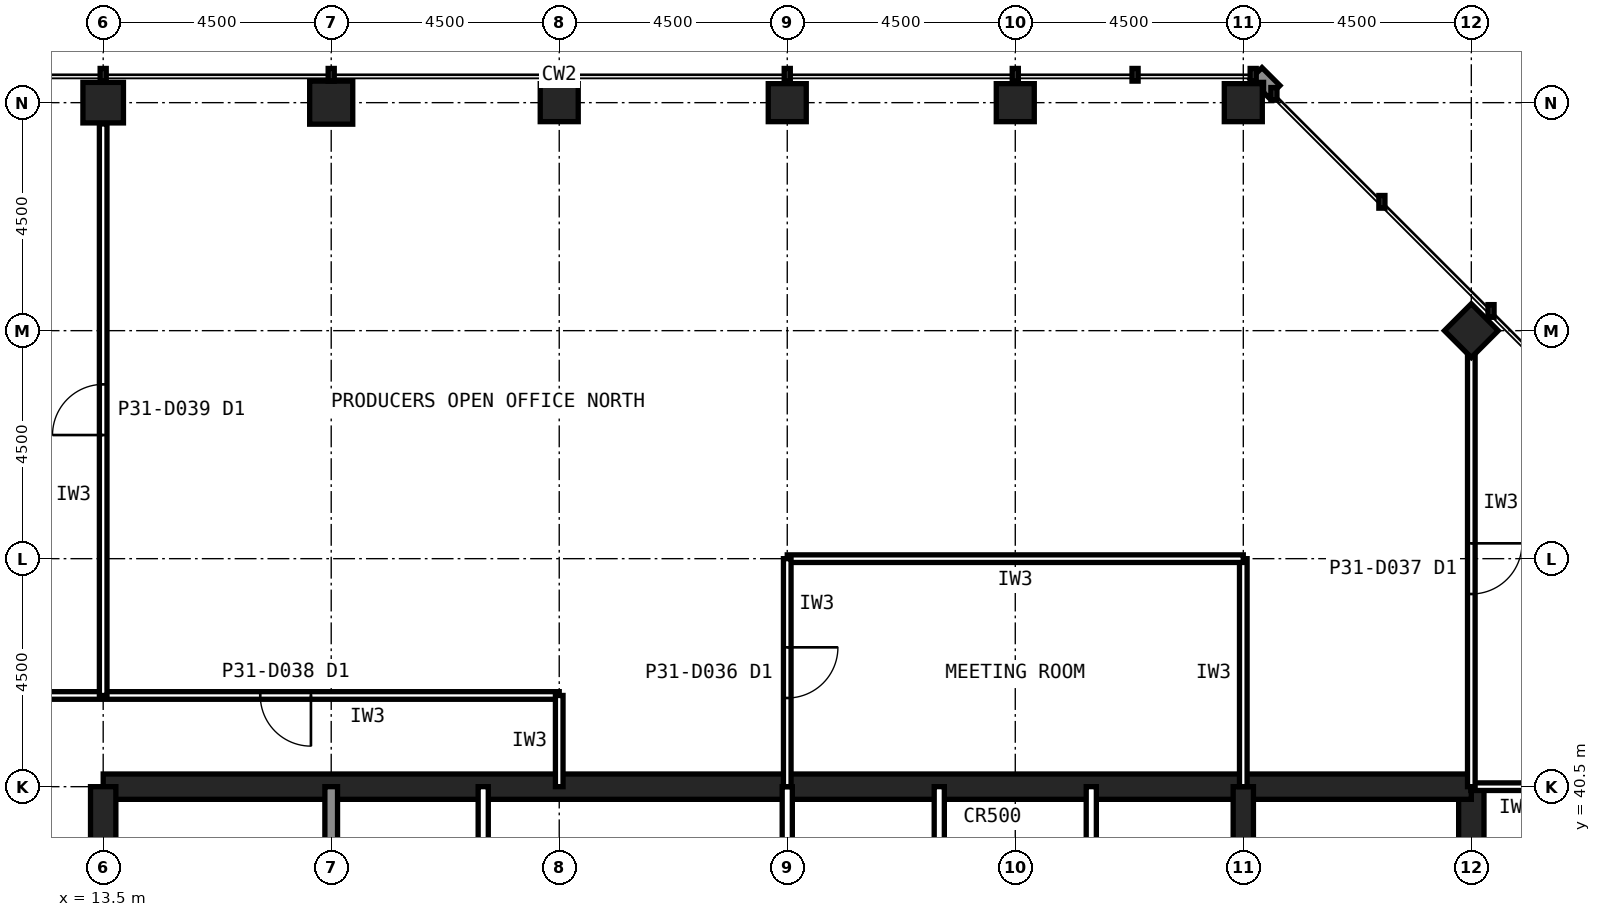
"""IFC4 building model, lengths in metres.
Left out: names, types, materials, properties, quantities, classifications, styles, units other than length and angle.
Written with IfcOpenShell. Run it as: python <this file> out.ifc"""

import sys

from ifc_helpers import new_model, si_unit, direction, frame, frame_2d, origin, origin_2d, place, context, subcontext, project, spatial, rectangle, hollow_rectangle, extrude, element, fill, save


model = new_model("IFC4")
c1 = context("Model", 3, precision=1e-05, world=origin(), true_north=direction((0.0, 1.0)))
c2 = subcontext(c1, "Body", "Model", "MODEL_VIEW")
j1 = project(units=[si_unit("LENGTHUNIT", "METRE"), si_unit("PLANEANGLEUNIT", "RADIAN")], contexts=[c1])
p1 = place(None, origin())
s1 = spatial("IfcSite", under=j1, at=p1, CompositionType="ELEMENT")
p2 = place(p1, origin())
s2 = spatial("IfcBuilding", under=s1, at=p2, CompositionType="ELEMENT")
p3 = place(p2, frame((0.0, 0.0, 135.6)))
s3 = spatial("IfcBuildingStorey", under=s2, at=p3, CompositionType="ELEMENT", Elevation=135.6)
for number, where, z_axis, x_axis in (
    (1, (36.0, 54.0, 0.0), (0.0, 0.0, 1.0), (1.0, 0.0, 0.0)),
    (2, (31.5, 54.0, 0.0), (0.0, 0.0, 1.0), (1.0, 0.0, 0.0)),
    (3, (27.0, 54.0, 0.0), (0.0, 0.0, 1.0), (1.0, 0.0, 0.0)),
    (4, (22.5, 54.0, 0.0), (0.0, 0.0, 1.0), (1.0, 0.0, 0.0)),
):
    element("IfcColumn", number, at=place(p3, frame(where, z_axis=z_axis, x_axis=x_axis)), inside=s3, PredefinedType="COLUMN", context=c2, shape_type="SweptSolid", body=[
        extrude(hollow_rectangle(XDim=0.75, YDim=0.75, WallThickness=0.04, at=origin_2d()), origin(), (0.0, 0.0, 1.0), 4.0),
    ])
p4 = place(p3, frame((18.0, 54.0, 0.0), z_axis=(0.0, 0.0, 1.0), x_axis=(1.0, 0.0, 0.0)))
e5 = element("IfcColumn", 5, at=p4, inside=s3, PredefinedType="COLUMN", context=c2, shape_type="SweptSolid", body=[
    extrude(hollow_rectangle(XDim=0.85, YDim=0.85, WallThickness=0.05, at=origin_2d()), origin(), (0.0, 0.0, 1.0), 4.0),
])
p5 = place(p3, frame((13.5, 54.0, 0.0), z_axis=(0.0, 0.0, 1.0), x_axis=(1.0, 0.0, 0.0)))
e6 = element("IfcColumn", 6, at=p5, inside=s3, PredefinedType="COLUMN", context=c2, shape_type="SweptSolid", body=[
    extrude(hollow_rectangle(XDim=0.8, YDim=0.8, WallThickness=0.045, at=origin_2d()), origin(), (0.0, 0.0, 1.0), 4.0),
])
p6 = place(p3, frame((40.5, 49.5, 0.0), z_axis=(0.0, 0.0, 1.0), x_axis=(0.707106781187, 0.707106781187, 0.0)))
e7 = element("IfcColumn", 7, at=p6, inside=s3, PredefinedType="COLUMN", context=c2, shape_type="SweptSolid", body=[
    extrude(hollow_rectangle(XDim=0.75, YDim=0.75, WallThickness=0.04, at=origin_2d()), origin(), (0.0, 0.0, 1.0), 4.0),
])
p7 = place(p3, frame((40.5, 13.5, 0.0), z_axis=(0.0, 0.0, 1.0), x_axis=(0.0, 1.0, 0.0)))
e8 = element("IfcWall", 8, at=p7, inside=s3, PredefinedType="SHEAR", context=c2, shape_type="SweptSolid", body=[
    extrude(rectangle(XDim=27.0, YDim=0.5, at=frame_2d((13.5, 0.0))), origin(), (0.0, 0.0, 1.0), 4.0),
])
p8 = place(p7, frame((5.85, 0.0, 0.0)))
e9 = element("IfcOpeningElement", 9, at=p8, cuts=e8, PredefinedType="OPENING", context=c2, shape_type="SweptSolid", body=[
    extrude(rectangle(XDim=1.8, YDim=2.1, at=frame_2d((0.9, 1.05))), frame((0.0, 0.26, 0.0), z_axis=(0.0, -1.0, 0.0), x_axis=(1.0, 0.0, 0.0)), (0.0, 0.0, 1.0), 0.52),
])
p9 = place(p7, frame((19.65, 0.0, 0.0)))
e10 = element("IfcOpeningElement", 10, at=p9, cuts=e8, PredefinedType="OPENING", context=c2, shape_type="SweptSolid", body=[
    extrude(rectangle(XDim=1.2, YDim=2.1, at=frame_2d((0.6, 1.05))), frame((0.0, 0.26, 0.0), z_axis=(0.0, -1.0, 0.0), x_axis=(1.0, 0.0, 0.0)), (0.0, 0.0, 1.0), 0.52),
])
p10 = place(p3, frame((40.5, 40.5, 0.0), z_axis=(0.0, 0.0, 1.0), x_axis=(-1.0, 0.0, 0.0)))
e11 = element("IfcWall", 11, at=p10, inside=s3, PredefinedType="SHEAR", context=c2, shape_type="SweptSolid", body=[
    extrude(rectangle(XDim=27.0, YDim=0.5, at=frame_2d((13.5, 0.0))), origin(), (0.0, 0.0, 1.0), 4.0),
])
p11 = place(p3, frame((13.5, 40.5, 0.0), z_axis=(0.0, 0.0, 1.0), x_axis=(0.0, -1.0, 0.0)))
e12 = element("IfcWall", 12, at=p11, inside=s3, PredefinedType="SHEAR", context=c2, shape_type="SweptSolid", body=[
    extrude(rectangle(XDim=27.0, YDim=0.5, at=frame_2d((13.5, 0.0))), origin(), (0.0, 0.0, 1.0), 4.0),
])
p12 = place(p11, frame((19.65, 0.0, 0.0)))
e13 = element("IfcOpeningElement", 13, at=p12, cuts=e12, PredefinedType="OPENING", context=c2, shape_type="SweptSolid", body=[
    extrude(rectangle(XDim=1.2, YDim=2.1, at=frame_2d((0.6, 1.05))), frame((0.0, 0.26, 0.0), z_axis=(0.0, -1.0, 0.0), x_axis=(1.0, 0.0, 0.0)), (0.0, 0.0, 1.0), 0.52),
])
p13 = place(p11, frame((5.85, 0.0, 0.0)))
e14 = element("IfcOpeningElement", 14, at=p13, cuts=e12, PredefinedType="OPENING", context=c2, shape_type="SweptSolid", body=[
    extrude(rectangle(XDim=1.8, YDim=2.1, at=frame_2d((0.9, 1.05))), frame((0.0, 0.26, 0.0), z_axis=(0.0, -1.0, 0.0), x_axis=(1.0, 0.0, 0.0)), (0.0, 0.0, 1.0), 0.52),
])
p14 = place(p3, frame((18.0, 36.0, 0.0), z_axis=(0.0, 0.0, 1.0), x_axis=(0.0, 1.0, 0.0)))
e15 = element("IfcWall", 15, at=p14, inside=s3, PredefinedType="SOLIDWALL", context=c2, shape_type="SweptSolid", body=[
    extrude(rectangle(XDim=4.5, YDim=0.25, at=frame_2d((2.25, 0.0))), origin(), (0.0, 0.0, 1.0), 3.84),
])
p15 = place(p3, frame((36.0, 22.5, 0.0), z_axis=(0.0, 0.0, 1.0), x_axis=(0.0, 1.0, 0.0)))
e16 = element("IfcWall", 16, at=p15, inside=s3, PredefinedType="SHEAR", context=c2, shape_type="SweptSolid", body=[
    extrude(rectangle(XDim=18.0, YDim=0.4, at=frame_2d((9.0, 0.0))), origin(), (0.0, 0.0, 1.0), 4.0),
])
for number, where, z_axis, x_axis in (
    (17, (21.0, 36.0, 0.0), (0.0, 0.0, 1.0), (0.0, 1.0, 0.0)),
    (18, (27.0, 36.0, 0.0), (0.0, 0.0, 1.0), (0.0, 1.0, 0.0)),
    (19, (30.0, 36.0, 0.0), (0.0, 0.0, 1.0), (0.0, 1.0, 0.0)),
    (20, (33.0, 36.0, 0.0), (0.0, 0.0, 1.0), (0.0, 1.0, 0.0)),
):
    element("IfcWall", number, at=place(p3, frame(where, z_axis=z_axis, x_axis=x_axis)), inside=s3, PredefinedType="PARTITIONING", context=c2, shape_type="SweptSolid", body=[
        extrude(rectangle(XDim=4.5, YDim=0.2, at=frame_2d((2.25, 0.0))), origin(), (0.0, 0.0, 1.0), 3.84),
    ])
p16 = place(p3, frame((22.5, 42.3, 0.0), z_axis=(0.0, 0.0, 1.0), x_axis=(-1.0, 0.0, 0.0)))
e21 = element("IfcWall", 21, at=p16, inside=s3, PredefinedType="PARTITIONING", context=c2, shape_type="SweptSolid", body=[
    extrude(rectangle(XDim=10.8, YDim=0.15, at=frame_2d((5.4, 0.0))), origin(), (0.0, 0.0, 1.0), 3.84),
])
p17 = place(p16, frame((4.9, 0.0, 0.0)))
e22 = element("IfcOpeningElement", 22, at=p17, cuts=e21, PredefinedType="OPENING", context=c2, shape_type="SweptSolid", body=[
    extrude(rectangle(XDim=1.0, YDim=2.1, at=frame_2d((0.5, 1.05))), frame((0.0, 0.085, 0.0), z_axis=(0.0, -1.0, 0.0), x_axis=(1.0, 0.0, 0.0)), (0.0, 0.0, 1.0), 0.17),
])
p18 = place(p3, frame((42.3, 40.5, 0.0), z_axis=(0.0, 0.0, 1.0), x_axis=(-1.0, 0.0, 0.0)))
e23 = element("IfcWall", 23, at=p18, inside=s3, PredefinedType="PARTITIONING", context=c2, shape_type="SweptSolid", body=[
    extrude(rectangle(XDim=1.81, YDim=0.15, at=frame_2d((0.905, 0.0))), origin(), (0.0, 0.0, 1.0), 2.989),
])
p19 = place(p3, frame((22.5, 40.5, 0.0), z_axis=(0.0, 0.0, 1.0), x_axis=(0.0, 1.0, 0.0)))
e24 = element("IfcWall", 24, at=p19, inside=s3, PredefinedType="PARTITIONING", context=c2, shape_type="SweptSolid", body=[
    extrude(rectangle(XDim=1.8, YDim=0.15, at=frame_2d((0.9, 0.0))), origin(), (0.0, 0.0, 1.0), 2.989),
])
p20 = place(p3, frame((36.0, 40.5, 0.0), z_axis=(0.0, 0.0, 1.0), x_axis=(0.0, 1.0, 0.0)))
e25 = element("IfcWall", 25, at=p20, inside=s3, PredefinedType="PARTITIONING", context=c2, shape_type="SweptSolid", body=[
    extrude(rectangle(XDim=4.5, YDim=0.15, at=frame_2d((2.25, 0.0))), origin(), (0.0, 0.0, 1.0), 2.989),
])
p21 = place(p3, frame((36.0, 45.0, 0.0), z_axis=(0.0, 0.0, 1.0), x_axis=(-1.0, 0.0, 0.0)))
e26 = element("IfcWall", 26, at=p21, inside=s3, PredefinedType="PARTITIONING", context=c2, shape_type="SweptSolid", body=[
    extrude(rectangle(XDim=9.0, YDim=0.15, at=frame_2d((4.5, 0.0))), origin(), (0.0, 0.0, 1.0), 3.84),
])
p22 = place(p3, frame((27.0, 45.0, 0.0), z_axis=(0.0, 0.0, 1.0), x_axis=(0.0, -1.0, 0.0)))
e27 = element("IfcWall", 27, at=p22, inside=s3, PredefinedType="PARTITIONING", context=c2, shape_type="SweptSolid", body=[
    extrude(rectangle(XDim=4.5, YDim=0.15, at=frame_2d((2.25, 0.0))), origin(), (0.0, 0.0, 1.0), 2.989),
])
p23 = place(p22, frame((1.75, 0.0, 0.0)))
e28 = element("IfcOpeningElement", 28, at=p23, cuts=e27, PredefinedType="OPENING", context=c2, shape_type="SweptSolid", body=[
    extrude(rectangle(XDim=1.0, YDim=2.1, at=frame_2d((0.5, 1.05))), frame((0.0, 0.085, 0.0), z_axis=(0.0, -1.0, 0.0), x_axis=(1.0, 0.0, 0.0)), (0.0, 0.0, 1.0), 0.17),
])
p24 = place(p3, frame((40.5, 49.105, 0.0), z_axis=(0.0, 0.0, 1.0), x_axis=(0.0, -1.0, 0.0)))
e29 = element("IfcWall", 29, at=p24, inside=s3, PredefinedType="PARTITIONING", context=c2, shape_type="SweptSolid", body=[
    extrude(rectangle(XDim=8.605, YDim=0.15, at=frame_2d((4.302, 0.0))), origin(), (0.0, 0.0, 1.0), 2.989),
])
p25 = place(p24, frame((3.802, 0.0, 0.0)))
e30 = element("IfcOpeningElement", 30, at=p25, cuts=e29, PredefinedType="OPENING", context=c2, shape_type="SweptSolid", body=[
    extrude(rectangle(XDim=1.0, YDim=2.1, at=frame_2d((0.5, 1.05))), frame((0.0, 0.085, 0.0), z_axis=(0.0, -1.0, 0.0), x_axis=(1.0, 0.0, 0.0)), (0.0, 0.0, 1.0), 0.17),
])
p26 = place(p3, frame((13.5, 42.3, 0.0), z_axis=(0.0, 0.0, 1.0), x_axis=(0.0, 1.0, 0.0)))
e31 = element("IfcWall", 31, at=p26, inside=s3, PredefinedType="PARTITIONING", context=c2, shape_type="SweptSolid", body=[
    extrude(rectangle(XDim=11.28, YDim=0.15, at=frame_2d((5.64, 0.0))), origin(), (0.0, 0.0, 1.0), 2.989),
])
p27 = place(p26, frame((5.14, 0.0, 0.0)))
e32 = element("IfcOpeningElement", 32, at=p27, cuts=e31, PredefinedType="OPENING", context=c2, shape_type="SweptSolid", body=[
    extrude(rectangle(XDim=1.0, YDim=2.1, at=frame_2d((0.5, 1.05))), frame((0.0, 0.085, 0.0), z_axis=(0.0, -1.0, 0.0), x_axis=(1.0, 0.0, 0.0)), (0.0, 0.0, 1.0), 0.17),
])
p28 = place(p17, origin())
e33 = element("IfcDoor", 33, at=p28, inside=s3, OperationType="SINGLE_SWING_LEFT", PredefinedType="DOOR", context=c2, shape_type="SweptSolid", body=[
    extrude(rectangle(XDim=1.0, YDim=2.1, at=frame_2d((0.5, 1.05))), frame((0.0, 0.025, 0.0), z_axis=(0.0, -1.0, 0.0), x_axis=(1.0, 0.0, 0.0)), (0.0, 0.0, 1.0), 0.05),
])
fill(e22, e33)
p29 = place(p23, origin())
e34 = element("IfcDoor", 34, at=p29, inside=s3, OperationType="SINGLE_SWING_LEFT", PredefinedType="DOOR", context=c2, shape_type="SweptSolid", body=[
    extrude(rectangle(XDim=1.0, YDim=2.1, at=frame_2d((0.5, 1.05))), frame((0.0, 0.025, 0.0), z_axis=(0.0, -1.0, 0.0), x_axis=(1.0, 0.0, 0.0)), (0.0, 0.0, 1.0), 0.05),
])
fill(e28, e34)
p30 = place(p25, origin())
e35 = element("IfcDoor", 35, at=p30, inside=s3, OperationType="SINGLE_SWING_LEFT", PredefinedType="DOOR", context=c2, shape_type="SweptSolid", body=[
    extrude(rectangle(XDim=1.0, YDim=2.1, at=frame_2d((0.5, 1.05))), frame((0.0, 0.025, 0.0), z_axis=(0.0, -1.0, 0.0), x_axis=(1.0, 0.0, 0.0)), (0.0, 0.0, 1.0), 0.05),
])
fill(e30, e35)
p31 = place(p27, origin())
e36 = element("IfcDoor", 36, at=p31, inside=s3, OperationType="SINGLE_SWING_LEFT", PredefinedType="DOOR", context=c2, shape_type="SweptSolid", body=[
    extrude(rectangle(XDim=1.0, YDim=2.1, at=frame_2d((0.5, 1.05))), frame((0.0, 0.025, 0.0), z_axis=(0.0, -1.0, 0.0), x_axis=(1.0, 0.0, 0.0)), (0.0, 0.0, 1.0), 0.05),
])
fill(e32, e36)
save(model, sys.argv[1])
